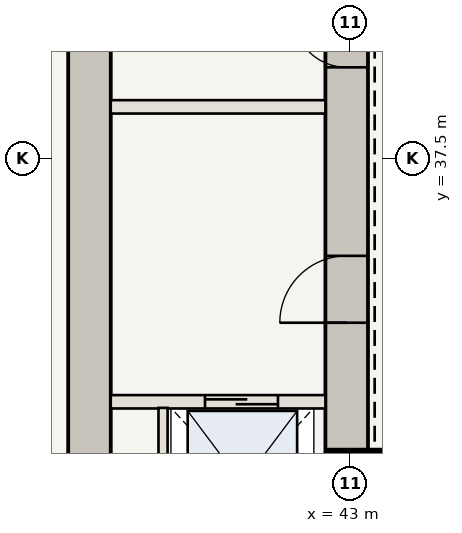
"""IFC4 building model, lengths in metres.
Left out: names, types, materials, properties, quantities, classifications, styles, units other than length and angle.
Written with IfcOpenShell. Run it as: python <this file> out.ifc"""

import sys

from ifc_helpers import new_model, si_unit, direction, frame, frame_2d, origin, origin_2d, place, context, subcontext, project, spatial, rectangle, extrude, element, fill, save


model = new_model("IFC4")
c1 = context("Model", 3, precision=1e-05, world=origin(), true_north=direction((0.0, 1.0)))
c2 = subcontext(c1, "Body", "Model", "MODEL_VIEW")
j1 = project(units=[si_unit("LENGTHUNIT", "METRE"), si_unit("PLANEANGLEUNIT", "RADIAN")], contexts=[c1])
p1 = place(None, origin())
s1 = spatial("IfcSite", under=j1, at=p1, CompositionType="ELEMENT")
p2 = place(p1, origin())
s2 = spatial("IfcBuilding", under=s1, at=p2, CompositionType="ELEMENT")
p3 = place(p2, origin())
s3 = spatial("IfcBuildingStorey", under=s2, at=p3, CompositionType="ELEMENT", Elevation=0.0)
p4 = place(p3, frame((42.94, 30.6, 0.0), z_axis=(0.0, 0.0, 1.0), x_axis=(0.0, 1.0, 0.0)))
e1 = element("IfcWall", 1, at=p4, inside=s3, PredefinedType="SHEAR", context=c2, shape_type="SweptSolid", body=[
    extrude(rectangle(XDim=12.75, YDim=0.7, at=frame_2d((6.375, 0.0))), origin(), (0.0, 0.0, 1.0), 6.65),
])
p5 = place(p4, frame((4.2, 0.0, 0.0)))
e2 = element("IfcOpeningElement", 2, at=p5, cuts=e1, PredefinedType="OPENING", context=c2, shape_type="SweptSolid", body=[
    extrude(rectangle(XDim=1.1, YDim=2.15, at=frame_2d((0.55, 1.075))), frame((0.0, 0.36, 0.0), z_axis=(0.0, -1.0, 0.0), x_axis=(1.0, 0.0, 0.0)), (0.0, 0.0, 1.0), 0.72),
])
p6 = place(p4, frame((8.4, 0.0, 0.0)))
e3 = element("IfcOpeningElement", 3, at=p6, cuts=e1, PredefinedType="OPENING", context=c2, shape_type="SweptSolid", body=[
    extrude(rectangle(XDim=0.88, YDim=2.1, at=frame_2d((0.44, 1.05))), frame((0.0, 0.36, 0.0), z_axis=(0.0, -1.0, 0.0), x_axis=(1.0, 0.0, 0.0)), (0.0, 0.0, 1.0), 0.72),
])
p7 = place(p4, frame((10.5, 0.0, 0.0)))
e4 = element("IfcOpeningElement", 4, at=p7, cuts=e1, PredefinedType="OPENING", context=c2, shape_type="SweptSolid", body=[
    extrude(rectangle(XDim=0.88, YDim=2.1, at=frame_2d((0.44, 1.05))), frame((0.0, 0.36, 0.0), z_axis=(0.0, -1.0, 0.0), x_axis=(1.0, 0.0, 0.0)), (0.0, 0.0, 1.0), 0.72),
])
p8 = place(p3, frame((38.71, 30.6, 0.0), z_axis=(0.0, 0.0, 1.0), x_axis=(0.0, 1.0, 0.0)))
e5 = element("IfcWall", 5, at=p8, inside=s3, PredefinedType="SHEAR", context=c2, shape_type="SweptSolid", body=[
    extrude(rectangle(XDim=12.05, YDim=0.7, at=frame_2d((6.025, 0.0))), origin(), (0.0, 0.0, 1.0), 6.65),
])
p9 = place(p3, frame((43.35, 32.0, 0.0), z_axis=(0.0, 0.0, 1.0), x_axis=(1.0, 0.0, 0.0)))
e6 = element("IfcColumn", 6, at=p9, inside=s3, PredefinedType="COLUMN", context=c2, shape_type="SweptSolid", body=[
    extrude(rectangle(XDim=1.4, YDim=1.4, at=origin_2d()), origin(), (0.0, 0.0, 1.0), 6.65),
])
p10 = place(p3, frame((39.06, 33.5, 0.0), z_axis=(0.0, 0.0, 1.0), x_axis=(1.0, 0.0, 0.0)))
e7 = element("IfcWall", 7, at=p10, inside=s3, PredefinedType="STANDARD", context=c2, shape_type="SweptSolid", body=[
    extrude(rectangle(XDim=3.53, YDim=0.22, at=frame_2d((1.765, 0.0))), origin(), (0.0, 0.0, 1.0), 6.41),
])
p11 = place(p10, frame((1.55, 0.0, 0.0)))
e8 = element("IfcOpeningElement", 8, at=p11, cuts=e7, PredefinedType="OPENING", context=c2, shape_type="SweptSolid", body=[
    extrude(rectangle(XDim=1.2, YDim=2.2, at=frame_2d((0.6, 1.1))), frame((0.0, 0.12, 0.0), z_axis=(0.0, -1.0, 0.0), x_axis=(1.0, 0.0, 0.0)), (0.0, 0.0, 1.0), 0.24),
])
p12 = place(p3, frame((39.92, 30.75, 0.0), z_axis=(0.0, 0.0, 1.0), x_axis=(0.0, 1.0, 0.0)))
e9 = element("IfcWall", 9, at=p12, inside=s3, PredefinedType="STANDARD", context=c2, shape_type="SweptSolid", body=[
    extrude(rectangle(XDim=2.65, YDim=0.15, at=frame_2d((1.325, 0.0))), origin(), (0.0, 0.0, 1.0), 6.41),
])
p13 = place(p3, frame((39.06, 38.35, 0.0), z_axis=(0.0, 0.0, 1.0), x_axis=(1.0, 0.0, 0.0)))
e10 = element("IfcWall", 10, at=p13, inside=s3, PredefinedType="STANDARD", context=c2, shape_type="SweptSolid", body=[
    extrude(rectangle(XDim=3.53, YDim=0.22, at=frame_2d((1.765, 0.0))), origin(), (0.0, 0.0, 1.0), 6.41),
])
p14 = place(p5, origin())
e11 = element("IfcDoor", 11, at=p14, inside=s3, OperationType="SINGLE_SWING_LEFT", PredefinedType="DOOR", context=c2, shape_type="SweptSolid", body=[
    extrude(rectangle(XDim=1.1, YDim=2.15, at=frame_2d((0.55, 1.075))), frame((0.0, 0.025, 0.0), z_axis=(0.0, -1.0, 0.0), x_axis=(1.0, 0.0, 0.0)), (0.0, 0.0, 1.0), 0.05),
])
fill(e2, e11)
p15 = place(p6, origin())
e12 = element("IfcDoor", 12, at=p15, inside=s3, OperationType="SINGLE_SWING_RIGHT", PredefinedType="DOOR", context=c2, shape_type="SweptSolid", body=[
    extrude(rectangle(XDim=0.88, YDim=2.1, at=frame_2d((0.44, 1.05))), frame((0.0, 0.025, 0.0), z_axis=(0.0, -1.0, 0.0), x_axis=(1.0, 0.0, 0.0)), (0.0, 0.0, 1.0), 0.05),
])
fill(e3, e12)
p16 = place(p11, origin())
e13 = element("IfcDoor", 13, at=p16, inside=s3, OperationType="DOUBLE_DOOR_SLIDING", PredefinedType="DOOR", context=c2, shape_type="SweptSolid", body=[
    extrude(rectangle(XDim=1.2, YDim=2.2, at=frame_2d((0.6, 1.1))), frame((0.0, 0.025, 0.0), z_axis=(0.0, -1.0, 0.0), x_axis=(1.0, 0.0, 0.0)), (0.0, 0.0, 1.0), 0.05),
])
fill(e8, e13)
save(model, sys.argv[1])
